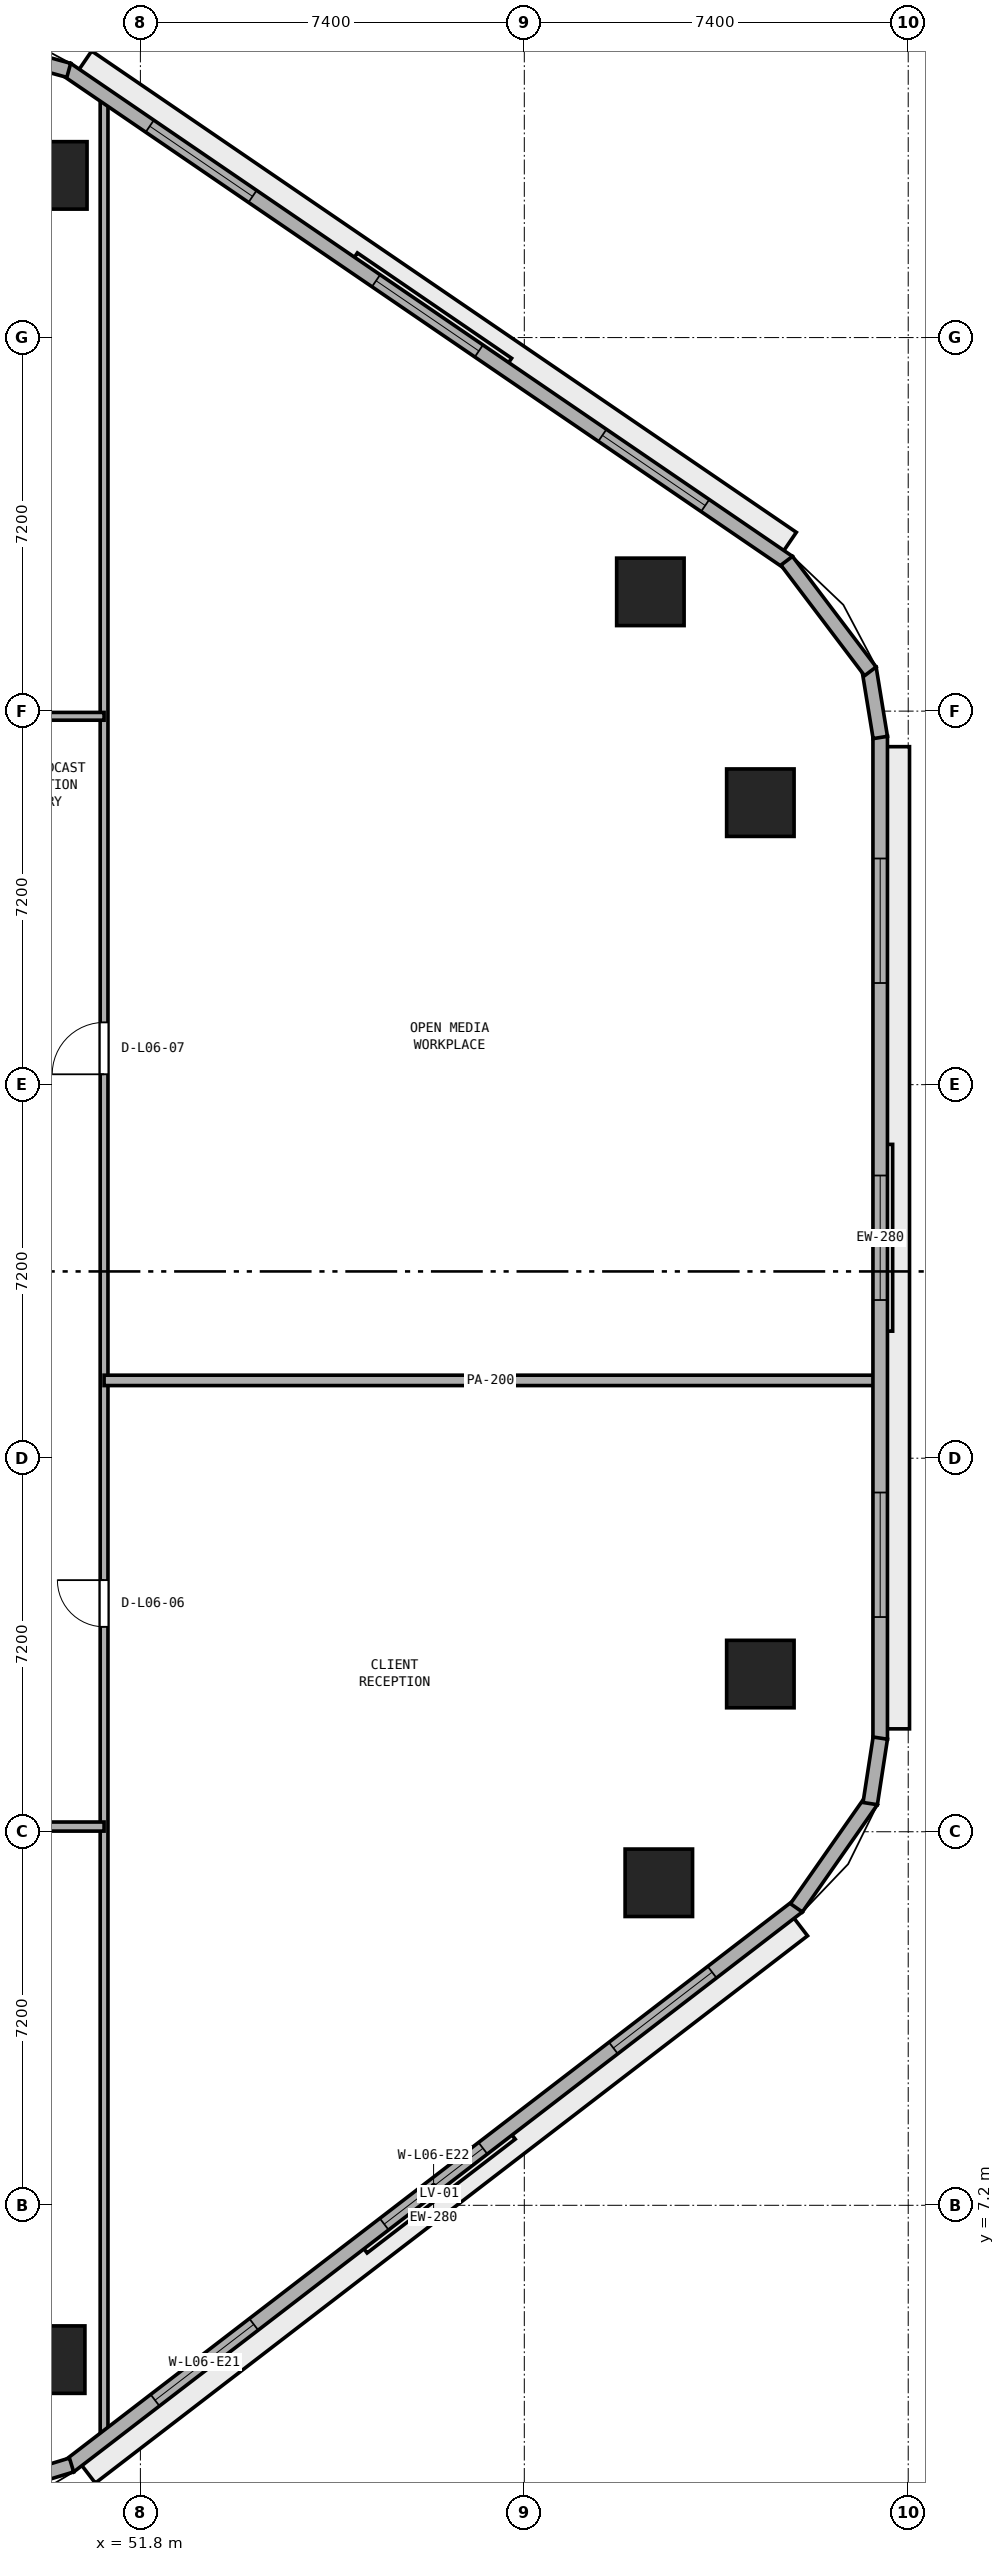
"""IFC4 building model, lengths in metres.
Left out: names, types, materials, properties, quantities, classifications, styles, units other than length and angle.
Written with IfcOpenShell. Run it as: python <this file> out.ifc"""

import sys

from ifc_helpers import new_model, si_unit, direction, frame, frame_2d, origin, origin_2d, place, context, subcontext, project, spatial, rectangle, extrude, element, fill, save


model = new_model("IFC4")
c1 = context("Model", 3, precision=1e-05, world=origin(), true_north=direction((0.0, 1.0)))
c2 = subcontext(c1, "Body", "Model", "MODEL_VIEW")
j1 = project(units=[si_unit("LENGTHUNIT", "METRE"), si_unit("PLANEANGLEUNIT", "RADIAN")], contexts=[c1])
p1 = place(None, origin())
s1 = spatial("IfcSite", under=j1, at=p1, CompositionType="ELEMENT")
p2 = place(p1, origin())
s2 = spatial("IfcBuilding", under=s1, at=p2, CompositionType="ELEMENT")
p3 = place(p2, frame((0.0, 0.0, 28.8)))
s3 = spatial("IfcBuildingStorey", under=s2, at=p3, CompositionType="ELEMENT", Elevation=28.8)
for number, where, z_axis, x_axis in (
    (1, (50.081, 4.225, 0.0), (0.0, 0.0, 1.0), (1.0, 0.0, 0.0)),
    (2, (61.793, 13.416, 0.0), (0.0, 0.0, 1.0), (1.0, 0.0, 0.0)),
    (3, (63.75, 17.44, 0.0), (0.0, 0.0, 1.0), (1.0, 0.0, 0.0)),
    (4, (63.75, 34.235, 0.0), (0.0, 0.0, 1.0), (1.0, 0.0, 0.0)),
    (5, (61.63, 38.299, 0.0), (0.0, 0.0, 1.0), (1.0, 0.0, 0.0)),
    (6, (50.122, 46.326, 0.0), (0.0, 0.0, 1.0), (1.0, 0.0, 0.0)),
):
    element("IfcColumn", number, at=place(p3, frame(where, z_axis=z_axis, x_axis=x_axis)), inside=s3, PredefinedType="COLUMN", context=c2, shape_type="SweptSolid", body=[
        extrude(rectangle(XDim=1.3, YDim=1.3, at=origin_2d()), origin(), (0.0, 0.0, 1.0), 3.8),
    ])
p4 = place(p3, frame((51.1, 2.651, 0.0), z_axis=(0.0, 0.0, 1.0), x_axis=(0.0, 1.0, 0.0)))
e7 = element("IfcWall", 7, at=p4, inside=s3, PredefinedType="PARTITIONING", context=c2, shape_type="SweptSolid", body=[
    extrude(rectangle(XDim=45.255, YDim=0.15, at=frame_2d((22.627, 0.0))), origin(), (0.0, 0.0, 1.0), 3.525),
])
p5 = place(p4, frame((15.699, 0.0, 0.0)))
e8 = element("IfcOpeningElement", 8, at=p5, cuts=e7, PredefinedType="OPENING", context=c2, shape_type="SweptSolid", body=[
    extrude(rectangle(XDim=0.9, YDim=2.1, at=frame_2d((0.45, 1.05))), frame((0.0, 0.085, 0.0), z_axis=(0.0, -1.0, 0.0), x_axis=(1.0, 0.0, 0.0)), (0.0, 0.0, 1.0), 0.17),
])
p6 = place(p4, frame((26.349, 0.0, 0.0)))
e9 = element("IfcOpeningElement", 9, at=p6, cuts=e7, PredefinedType="OPENING", context=c2, shape_type="SweptSolid", body=[
    extrude(rectangle(XDim=1.0, YDim=2.12, at=frame_2d((0.5, 1.06))), frame((0.0, 0.085, 0.0), z_axis=(0.0, -1.0, 0.0), x_axis=(1.0, 0.0, 0.0)), (0.0, 0.0, 1.0), 0.17),
])
p7 = place(p3, frame((22.9, 14.5, 0.0), z_axis=(0.0, 0.0, 1.0), x_axis=(1.0, 0.0, 0.0)))
e10 = element("IfcWall", 10, at=p7, inside=s3, PredefinedType="PARTITIONING", context=c2, shape_type="SweptSolid", body=[
    extrude(rectangle(XDim=28.2, YDim=0.175, at=frame_2d((14.1, 0.0))), origin(), (0.0, 0.0, 1.0), 3.525),
])
p8 = place(p7, frame((10.07, 0.0, 0.0)))
e11 = element("IfcOpeningElement", 11, at=p8, cuts=e10, PredefinedType="OPENING", context=c2, shape_type="SweptSolid", body=[
    extrude(rectangle(XDim=0.9, YDim=2.1, at=frame_2d((0.45, 1.05))), frame((0.0, 0.097, 0.0), z_axis=(0.0, -1.0, 0.0), x_axis=(1.0, 0.0, 0.0)), (0.0, 0.0, 1.0), 0.195),
])
p9 = place(p7, frame((23.93, 0.0, 0.0)))
e12 = element("IfcOpeningElement", 12, at=p9, cuts=e10, PredefinedType="OPENING", context=c2, shape_type="SweptSolid", body=[
    extrude(rectangle(XDim=0.9, YDim=2.1, at=frame_2d((0.45, 1.05))), frame((0.0, 0.097, 0.0), z_axis=(0.0, -1.0, 0.0), x_axis=(1.0, 0.0, 0.0)), (0.0, 0.0, 1.0), 0.195),
])
p10 = place(p3, frame((51.1, 23.1, 0.0), z_axis=(0.0, 0.0, 1.0), x_axis=(1.0, 0.0, 0.0)))
e13 = element("IfcWall", 13, at=p10, inside=s3, PredefinedType="PARTITIONING", context=c2, shape_type="SweptSolid", body=[
    extrude(rectangle(XDim=14.895, YDim=0.2, at=frame_2d((7.448, 0.0))), origin(), (0.0, 0.0, 1.0), 3.525),
])
p11 = place(p3, frame((22.9, 35.9, 0.0), z_axis=(0.0, 0.0, 1.0), x_axis=(1.0, 0.0, 0.0)))
e14 = element("IfcWall", 14, at=p11, inside=s3, PredefinedType="PARTITIONING", context=c2, shape_type="SweptSolid", body=[
    extrude(rectangle(XDim=28.2, YDim=0.15, at=frame_2d((14.1, 0.0))), origin(), (0.0, 0.0, 1.0), 3.525),
])
p12 = place(p11, frame((13.6, 0.0, 0.0)))
e15 = element("IfcOpeningElement", 15, at=p12, cuts=e14, PredefinedType="OPENING", context=c2, shape_type="SweptSolid", body=[
    extrude(rectangle(XDim=1.0, YDim=2.12, at=frame_2d((0.5, 1.06))), frame((0.0, 0.085, 0.0), z_axis=(0.0, -1.0, 0.0), x_axis=(1.0, 0.0, 0.0)), (0.0, 0.0, 1.0), 0.17),
])
p13 = place(p3, frame((50.429, 2.172, 0.0), z_axis=(0.0, 0.0, 1.0), x_axis=(0.792937466367, 0.609303023488, 0.0)))
e16 = element("IfcWall", 16, at=p13, inside=s3, PredefinedType="STANDARD", context=c2, shape_type="SweptSolid", body=[
    extrude(rectangle(XDim=17.713, YDim=0.28, at=frame_2d((8.856, 0.0))), origin(), (0.0, 0.0, 1.0), 3.525),
])
p14 = place(p13, frame((2.085, 0.0, 0.9)))
e17 = element("IfcOpeningElement", 17, at=p14, cuts=e16, PredefinedType="OPENING", context=c2, shape_type="SweptSolid", body=[
    extrude(rectangle(XDim=2.4, YDim=1.75, at=frame_2d((1.2, 0.875))), frame((0.0, 0.15, 0.0), z_axis=(0.0, -1.0, 0.0), x_axis=(1.0, 0.0, 0.0)), (0.0, 0.0, 1.0), 0.3),
])
p15 = place(p13, frame((7.656, 0.0, 0.9)))
e18 = element("IfcOpeningElement", 18, at=p15, cuts=e16, PredefinedType="OPENING", context=c2, shape_type="SweptSolid", body=[
    extrude(rectangle(XDim=2.4, YDim=1.75, at=frame_2d((1.2, 0.875))), frame((0.0, 0.15, 0.0), z_axis=(0.0, -1.0, 0.0), x_axis=(1.0, 0.0, 0.0)), (0.0, 0.0, 1.0), 0.3),
])
p16 = place(p13, frame((13.227, 0.0, 0.9)))
e19 = element("IfcOpeningElement", 19, at=p16, cuts=e16, PredefinedType="OPENING", context=c2, shape_type="SweptSolid", body=[
    extrude(rectangle(XDim=2.4, YDim=1.75, at=frame_2d((1.2, 0.875))), frame((0.0, 0.15, 0.0), z_axis=(0.0, -1.0, 0.0), x_axis=(1.0, 0.0, 0.0)), (0.0, 0.0, 1.0), 0.3),
])
p17 = place(p3, frame((66.06, 16.183, 0.0), z_axis=(0.0, 0.0, 1.0), x_axis=(0.0, 1.0, 0.0)))
e20 = element("IfcWall", 20, at=p17, inside=s3, PredefinedType="STANDARD", context=c2, shape_type="SweptSolid", body=[
    extrude(rectangle(XDim=19.331, YDim=0.28, at=frame_2d((9.666, 0.0))), origin(), (0.0, 0.0, 1.0), 3.525),
])
p18 = place(p17, frame((2.355, 0.0, 0.9)))
e21 = element("IfcOpeningElement", 21, at=p18, cuts=e20, PredefinedType="OPENING", context=c2, shape_type="SweptSolid", body=[
    extrude(rectangle(XDim=2.4, YDim=1.75, at=frame_2d((1.2, 0.875))), frame((0.0, 0.15, 0.0), z_axis=(0.0, -1.0, 0.0), x_axis=(1.0, 0.0, 0.0)), (0.0, 0.0, 1.0), 0.3),
])
p19 = place(p17, frame((8.466, 0.0, 0.9)))
e22 = element("IfcOpeningElement", 22, at=p19, cuts=e20, PredefinedType="OPENING", context=c2, shape_type="SweptSolid", body=[
    extrude(rectangle(XDim=2.4, YDim=1.75, at=frame_2d((1.2, 0.875))), frame((0.0, 0.15, 0.0), z_axis=(0.0, -1.0, 0.0), x_axis=(1.0, 0.0, 0.0)), (0.0, 0.0, 1.0), 0.3),
])
p20 = place(p17, frame((14.576, 0.0, 0.9)))
e23 = element("IfcOpeningElement", 23, at=p20, cuts=e20, PredefinedType="OPENING", context=c2, shape_type="SweptSolid", body=[
    extrude(rectangle(XDim=2.4, YDim=1.75, at=frame_2d((1.2, 0.875))), frame((0.0, 0.15, 0.0), z_axis=(0.0, -1.0, 0.0), x_axis=(1.0, 0.0, 0.0)), (0.0, 0.0, 1.0), 0.3),
])
p21 = place(p3, frame((64.29, 38.867, 0.0), z_axis=(0.0, 0.0, 1.0), x_axis=(-0.825755550159, 0.564028165416, 0.0)))
e24 = element("IfcWall", 24, at=p21, inside=s3, PredefinedType="STANDARD", context=c2, shape_type="SweptSolid", body=[
    extrude(rectangle(XDim=16.848, YDim=0.28, at=frame_2d((8.424, 0.0))), origin(), (0.0, 0.0, 1.0), 3.525),
])
p22 = place(p21, frame((1.941, 0.0, 0.9)))
e25 = element("IfcOpeningElement", 25, at=p22, cuts=e24, PredefinedType="OPENING", context=c2, shape_type="SweptSolid", body=[
    extrude(rectangle(XDim=2.4, YDim=1.75, at=frame_2d((1.2, 0.875))), frame((0.0, 0.15, 0.0), z_axis=(0.0, -1.0, 0.0), x_axis=(1.0, 0.0, 0.0)), (0.0, 0.0, 1.0), 0.3),
])
p23 = place(p21, frame((7.224, 0.0, 0.9)))
e26 = element("IfcOpeningElement", 26, at=p23, cuts=e24, PredefinedType="OPENING", context=c2, shape_type="SweptSolid", body=[
    extrude(rectangle(XDim=2.4, YDim=1.75, at=frame_2d((1.2, 0.875))), frame((0.0, 0.15, 0.0), z_axis=(0.0, -1.0, 0.0), x_axis=(1.0, 0.0, 0.0)), (0.0, 0.0, 1.0), 0.3),
])
p24 = place(p21, frame((12.507, 0.0, 0.9)))
e27 = element("IfcOpeningElement", 27, at=p24, cuts=e24, PredefinedType="OPENING", context=c2, shape_type="SweptSolid", body=[
    extrude(rectangle(XDim=2.4, YDim=1.75, at=frame_2d((1.2, 0.875))), frame((0.0, 0.15, 0.0), z_axis=(0.0, -1.0, 0.0), x_axis=(1.0, 0.0, 0.0)), (0.0, 0.0, 1.0), 0.3),
])
p25 = place(p3, frame((47.65, 1.333, 0.0), z_axis=(0.0, 0.0, 1.0), x_axis=(0.956461287977, 0.291859220516, 0.0)))
e28 = element("IfcWall", 28, at=p25, inside=s3, PredefinedType="STANDARD", context=c2, shape_type="SweptSolid", body=[
    extrude(rectangle(XDim=2.952, YDim=0.28, at=frame_2d((1.476, 0.0))), origin(), (0.0, 0.0, 1.0), 3.525),
])
p26 = place(p3, frame((64.444, 12.933, 0.0), z_axis=(0.0, 0.0, 1.0), x_axis=(0.573176686443, 0.819431806875, 0.0)))
e29 = element("IfcWall", 29, at=p26, inside=s3, PredefinedType="STANDARD", context=c2, shape_type="SweptSolid", body=[
    extrude(rectangle(XDim=2.524, YDim=0.28, at=frame_2d((1.262, 0.0))), origin(), (0.0, 0.0, 1.0), 3.525),
])
p27 = place(p3, frame((65.867, 14.943, 0.0), z_axis=(0.0, 0.0, 1.0), x_axis=(0.152014078361, 0.988378328364, 0.0)))
e30 = element("IfcWall", 30, at=p27, inside=s3, PredefinedType="STANDARD", context=c2, shape_type="SweptSolid", body=[
    extrude(rectangle(XDim=1.277, YDim=0.28, at=frame_2d((0.638, 0.0))), origin(), (0.0, 0.0, 1.0), 3.525),
])
p28 = place(p3, frame((66.062, 35.492, 0.0), z_axis=(0.0, 0.0, 1.0), x_axis=(-0.161182073582, 0.986924687682, 0.0)))
e31 = element("IfcWall", 31, at=p28, inside=s3, PredefinedType="STANDARD", context=c2, shape_type="SweptSolid", body=[
    extrude(rectangle(XDim=1.354, YDim=0.28, at=frame_2d((0.677, 0.0))), origin(), (0.0, 0.0, 1.0), 3.525),
])
p29 = place(p3, frame((65.87, 36.767, 0.0), z_axis=(0.0, 0.0, 1.0), x_axis=(-0.603370463754, 0.797461023166, 0.0)))
e32 = element("IfcWall", 32, at=p29, inside=s3, PredefinedType="STANDARD", context=c2, shape_type="SweptSolid", body=[
    extrude(rectangle(XDim=2.673, YDim=0.28, at=frame_2d((1.336, 0.0))), origin(), (0.0, 0.0, 1.0), 3.525),
])
p30 = place(p3, frame((50.419, 48.351, 0.0), z_axis=(0.0, 0.0, 1.0), x_axis=(-0.964254516967, 0.264977784933, 0.0)))
e33 = element("IfcWall", 33, at=p30, inside=s3, PredefinedType="STANDARD", context=c2, shape_type="SweptSolid", body=[
    extrude(rectangle(XDim=2.731, YDim=0.28, at=frame_2d((1.365, 0.0))), origin(), (0.0, 0.0, 1.0), 3.525),
])
p31 = place(p5, origin())
e34 = element("IfcDoor", 34, at=p31, inside=s3, OperationType="SINGLE_SWING_RIGHT", PredefinedType="DOOR", context=c2, shape_type="SweptSolid", body=[
    extrude(rectangle(XDim=0.9, YDim=2.1, at=frame_2d((0.45, 1.05))), frame((0.0, 0.025, 0.0), z_axis=(0.0, -1.0, 0.0), x_axis=(1.0, 0.0, 0.0)), (0.0, 0.0, 1.0), 0.05),
])
fill(e8, e34)
p32 = place(p6, origin())
e35 = element("IfcDoor", 35, at=p32, inside=s3, OperationType="SINGLE_SWING_LEFT", PredefinedType="DOOR", context=c2, shape_type="SweptSolid", body=[
    extrude(rectangle(XDim=1.0, YDim=2.12, at=frame_2d((0.5, 1.06))), frame((0.0, 0.025, 0.0), z_axis=(0.0, -1.0, 0.0), x_axis=(1.0, 0.0, 0.0)), (0.0, 0.0, 1.0), 0.05),
])
fill(e9, e35)
p33 = place(p14, origin())
e36 = element("IfcWindow", 36, at=p33, inside=s3, PartitioningType="SINGLE_PANEL", PredefinedType="WINDOW", context=c2, shape_type="SweptSolid", body=[
    extrude(rectangle(XDim=2.4, YDim=1.75, at=frame_2d((1.2, 0.875))), frame((0.0, 0.03, 0.0), z_axis=(0.0, -1.0, 0.0), x_axis=(1.0, 0.0, 0.0)), (0.0, 0.0, 1.0), 0.06),
])
fill(e17, e36)
p34 = place(p15, origin())
e37 = element("IfcWindow", 37, at=p34, inside=s3, PartitioningType="SINGLE_PANEL", PredefinedType="WINDOW", context=c2, shape_type="SweptSolid", body=[
    extrude(rectangle(XDim=2.4, YDim=1.75, at=frame_2d((1.2, 0.875))), frame((0.0, 0.03, 0.0), z_axis=(0.0, -1.0, 0.0), x_axis=(1.0, 0.0, 0.0)), (0.0, 0.0, 1.0), 0.06),
])
fill(e18, e37)
p35 = place(p16, origin())
e38 = element("IfcWindow", 38, at=p35, inside=s3, PartitioningType="SINGLE_PANEL", PredefinedType="WINDOW", context=c2, shape_type="SweptSolid", body=[
    extrude(rectangle(XDim=2.4, YDim=1.75, at=frame_2d((1.2, 0.875))), frame((0.0, 0.03, 0.0), z_axis=(0.0, -1.0, 0.0), x_axis=(1.0, 0.0, 0.0)), (0.0, 0.0, 1.0), 0.06),
])
fill(e19, e38)
p36 = place(p18, origin())
e39 = element("IfcWindow", 39, at=p36, inside=s3, PartitioningType="SINGLE_PANEL", PredefinedType="WINDOW", context=c2, shape_type="SweptSolid", body=[
    extrude(rectangle(XDim=2.4, YDim=1.75, at=frame_2d((1.2, 0.875))), frame((0.0, 0.03, 0.0), z_axis=(0.0, -1.0, 0.0), x_axis=(1.0, 0.0, 0.0)), (0.0, 0.0, 1.0), 0.06),
])
fill(e21, e39)
p37 = place(p19, origin())
e40 = element("IfcWindow", 40, at=p37, inside=s3, PartitioningType="SINGLE_PANEL", PredefinedType="WINDOW", context=c2, shape_type="SweptSolid", body=[
    extrude(rectangle(XDim=2.4, YDim=1.75, at=frame_2d((1.2, 0.875))), frame((0.0, 0.03, 0.0), z_axis=(0.0, -1.0, 0.0), x_axis=(1.0, 0.0, 0.0)), (0.0, 0.0, 1.0), 0.06),
])
fill(e22, e40)
p38 = place(p20, origin())
e41 = element("IfcWindow", 41, at=p38, inside=s3, PartitioningType="SINGLE_PANEL", PredefinedType="WINDOW", context=c2, shape_type="SweptSolid", body=[
    extrude(rectangle(XDim=2.4, YDim=1.75, at=frame_2d((1.2, 0.875))), frame((0.0, 0.03, 0.0), z_axis=(0.0, -1.0, 0.0), x_axis=(1.0, 0.0, 0.0)), (0.0, 0.0, 1.0), 0.06),
])
fill(e23, e41)
p39 = place(p22, origin())
e42 = element("IfcWindow", 42, at=p39, inside=s3, PartitioningType="SINGLE_PANEL", PredefinedType="WINDOW", context=c2, shape_type="SweptSolid", body=[
    extrude(rectangle(XDim=2.4, YDim=1.75, at=frame_2d((1.2, 0.875))), frame((0.0, 0.03, 0.0), z_axis=(0.0, -1.0, 0.0), x_axis=(1.0, 0.0, 0.0)), (0.0, 0.0, 1.0), 0.06),
])
fill(e25, e42)
p40 = place(p23, origin())
e43 = element("IfcWindow", 43, at=p40, inside=s3, PartitioningType="SINGLE_PANEL", PredefinedType="WINDOW", context=c2, shape_type="SweptSolid", body=[
    extrude(rectangle(XDim=2.4, YDim=1.75, at=frame_2d((1.2, 0.875))), frame((0.0, 0.03, 0.0), z_axis=(0.0, -1.0, 0.0), x_axis=(1.0, 0.0, 0.0)), (0.0, 0.0, 1.0), 0.06),
])
fill(e26, e43)
p41 = place(p24, origin())
e44 = element("IfcWindow", 44, at=p41, inside=s3, PartitioningType="SINGLE_PANEL", PredefinedType="WINDOW", context=c2, shape_type="SweptSolid", body=[
    extrude(rectangle(XDim=2.4, YDim=1.75, at=frame_2d((1.2, 0.875))), frame((0.0, 0.03, 0.0), z_axis=(0.0, -1.0, 0.0), x_axis=(1.0, 0.0, 0.0)), (0.0, 0.0, 1.0), 0.06),
])
fill(e27, e44)
save(model, sys.argv[1])
